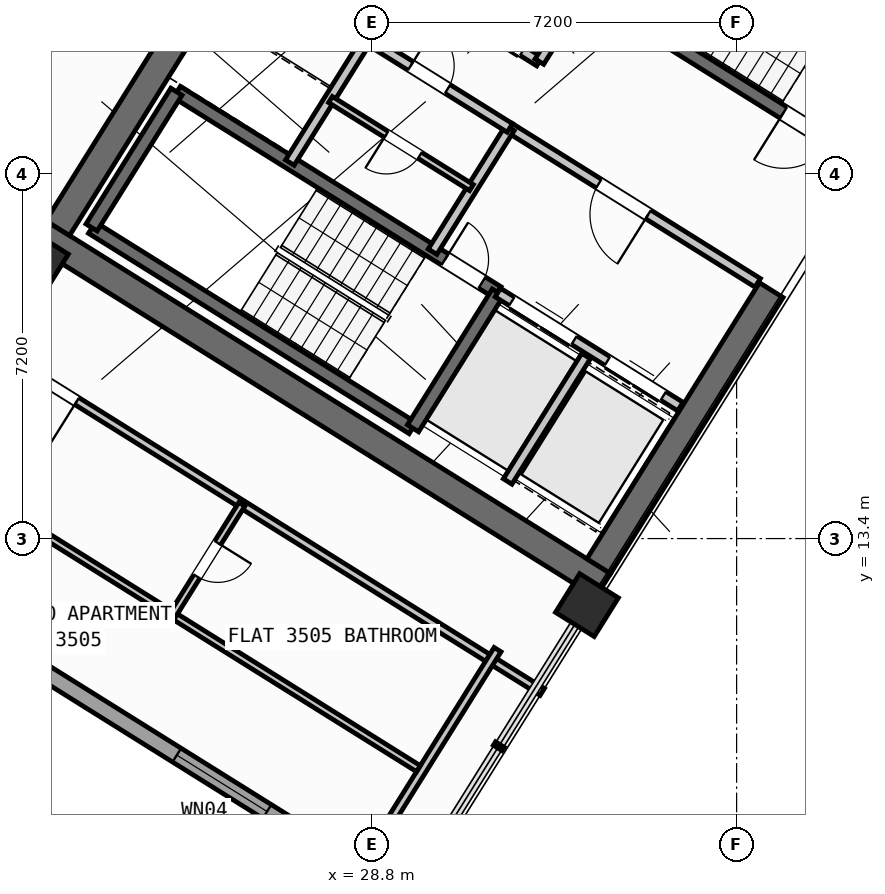
"""IFC4 building model, lengths in metres.
Left out: names, types, materials, properties, quantities, classifications, styles, units other than length and angle.
Written with IfcOpenShell. Run it as: python <this file> out.ifc"""

import sys

from ifc_helpers import new_model, si_unit, direction, frame, frame_2d, origin, origin_2d, place, context, subcontext, project, spatial, rectangle, hollow_rectangle, extrude, source, transform, mapped, element, fill, save


model = new_model("IFC4")
c1 = context("Model", 3, precision=1e-05, world=origin(), true_north=direction((0.0, 1.0)))
c2 = subcontext(c1, "Body", "Model", "MODEL_VIEW")
j1 = project(units=[si_unit("LENGTHUNIT", "METRE"), si_unit("PLANEANGLEUNIT", "RADIAN")], contexts=[c1])
p1 = place(None, origin())
s1 = spatial("IfcSite", under=j1, at=p1, CompositionType="ELEMENT")
p2 = place(p1, origin())
s2 = spatial("IfcBuilding", under=s1, at=p2, CompositionType="ELEMENT")
p3 = place(p2, frame((0.0, 0.0, 140.7)))
s3 = spatial("IfcBuildingStorey", under=s2, at=p3, CompositionType="ELEMENT", Elevation=140.7)
p4 = place(p3, frame((33.366, 12.477, 0.0), z_axis=(0.0, 0.0, 1.0), x_axis=(-0.848047359947, 0.529920442413, 0.0)))
e1 = element("IfcWall", 1, at=p4, inside=s3, PredefinedType="SHEAR", context=c2, shape_type="SweptSolid", body=[
    extrude(rectangle(XDim=13.14, YDim=0.55, at=frame_2d((6.57, 0.0))), origin(), (0.0, 0.0, 1.0), 3.35),
])
p5 = place(p3, frame((36.683, 18.304, 0.0), z_axis=(0.0, 0.0, 1.0), x_axis=(-0.529896466841, -0.848062341122, 0.0)))
e2 = element("IfcWall", 2, at=p5, inside=s3, PredefinedType="SHEAR", context=c2, shape_type="SweptSolid", body=[
    extrude(rectangle(XDim=6.425, YDim=0.55, at=frame_2d((3.212, 0.0))), origin(), (0.0, 0.0, 1.0), 3.35),
])
p6 = place(p3, frame((26.007, 24.976, 0.0), z_axis=(0.0, 0.0, 1.0), x_axis=(-0.529923795287, -0.848045264823, 0.0)))
e3 = element("IfcWall", 3, at=p6, inside=s3, PredefinedType="SHEAR", context=c2, shape_type="SweptSolid", body=[
    extrude(rectangle(XDim=6.425, YDim=0.55, at=frame_2d((3.212, 0.0))), origin(), (0.0, 0.0, 1.0), 3.35),
])
m1 = source(origin(), c2, "Body", "SweptSolid", [
    extrude(hollow_rectangle(XDim=0.9, YDim=0.9, WallThickness=0.036, at=origin_2d()), origin(), (0.0, 0.0, 1.0), 3.6),
])
for number, where, z_axis, x_axis in (
    (4, (33.046, 12.087, 0.0), (0.0, 0.0, 1.0), (-0.848, 0.53, 0.0)),
    (5, (22.191, 18.87, 0.0), (0.0, 0.0, 1.0), (-0.848, 0.53, 0.0)),
):
    element("IfcColumn", number, at=place(p3, frame(where, z_axis=z_axis, x_axis=x_axis)), inside=s3, PredefinedType="COLUMN", context=c2, shape_type="MappedRepresentation", body=[
        mapped(m1, transform((0.0, 0.0, 0.0), scale=1.0)),
    ])
p7 = place(p3, frame((29.268, 6.429, 0.0), z_axis=(0.0, 0.0, 1.0), x_axis=(-0.848049971435, 0.529916263149, 0.0)))
e6 = element("IfcWall", 6, at=p7, inside=s3, PredefinedType="STANDARD", context=c2, shape_type="SweptSolid", body=[
    extrude(rectangle(XDim=31.588, YDim=0.32, at=frame_2d((15.794, 0.0))), origin(), (0.0, 0.0, 1.0), 3.35),
])
p8 = place(p7, frame((16.362, 0.0, 0.0)))
e7 = element("IfcOpeningElement", 7, at=p8, cuts=e6, PredefinedType="OPENING", context=c2, shape_type="SweptSolid", body=[
    extrude(rectangle(XDim=1.2, YDim=2.15, at=frame_2d((0.6, 1.075))), frame((0.0, 0.17, 0.0), z_axis=(0.0, -1.0, 0.0), x_axis=(1.0, 0.0, 0.0)), (0.0, 0.0, 1.0), 0.34),
])
p9 = place(p7, frame((2.989, 0.0, 0.8)))
e8 = element("IfcOpeningElement", 8, at=p9, cuts=e6, PredefinedType="OPENING", context=c2, shape_type="SweptSolid", body=[
    extrude(rectangle(XDim=2.1, YDim=1.55, at=frame_2d((1.05, 0.775))), frame((0.0, 0.17, 0.0), z_axis=(0.0, -1.0, 0.0), x_axis=(1.0, 0.0, 0.0)), (0.0, 0.0, 1.0), 0.34),
])
p10 = place(p7, frame((8.359, 0.0, 0.8)))
e9 = element("IfcOpeningElement", 9, at=p10, cuts=e6, PredefinedType="OPENING", context=c2, shape_type="SweptSolid", body=[
    extrude(rectangle(XDim=2.1, YDim=1.55, at=frame_2d((1.05, 0.775))), frame((0.0, 0.17, 0.0), z_axis=(0.0, -1.0, 0.0), x_axis=(1.0, 0.0, 0.0)), (0.0, 0.0, 1.0), 0.34),
])
p11 = place(p7, frame((13.284, 0.0, 0.95)))
e10 = element("IfcOpeningElement", 10, at=p11, cuts=e6, PredefinedType="OPENING", context=c2, shape_type="SweptSolid", body=[
    extrude(rectangle(XDim=1.2, YDim=1.4, at=frame_2d((0.6, 0.7))), frame((0.0, 0.17, 0.0), z_axis=(0.0, -1.0, 0.0), x_axis=(1.0, 0.0, 0.0)), (0.0, 0.0, 1.0), 0.34),
])
p12 = place(p7, frame((29.188, 0.0, 0.95)))
e11 = element("IfcOpeningElement", 11, at=p12, cuts=e6, PredefinedType="OPENING", context=c2, shape_type="SweptSolid", body=[
    extrude(rectangle(XDim=1.2, YDim=1.4, at=frame_2d((0.6, 0.7))), frame((0.0, 0.17, 0.0), z_axis=(0.0, -1.0, 0.0), x_axis=(1.0, 0.0, 0.0)), (0.0, 0.0, 1.0), 0.34),
])
p13 = place(p7, frame((19.674, 0.0, 1.0)))
e12 = element("IfcOpeningElement", 12, at=p13, cuts=e6, PredefinedType="OPENING", context=c2, shape_type="SweptSolid", body=[
    extrude(rectangle(XDim=0.9, YDim=1.25, at=frame_2d((0.45, 0.625))), frame((0.0, 0.17, 0.0), z_axis=(0.0, -1.0, 0.0), x_axis=(1.0, 0.0, 0.0)), (0.0, 0.0, 1.0), 0.34),
])
p14 = place(p7, frame((21.896, 0.0, 1.0)))
e13 = element("IfcOpeningElement", 13, at=p14, cuts=e6, PredefinedType="OPENING", context=c2, shape_type="SweptSolid", body=[
    extrude(rectangle(XDim=0.9, YDim=1.25, at=frame_2d((0.45, 0.625))), frame((0.0, 0.17, 0.0), z_axis=(0.0, -1.0, 0.0), x_axis=(1.0, 0.0, 0.0)), (0.0, 0.0, 1.0), 0.34),
])
p15 = place(p7, frame((24.106, 0.0, 1.0)))
e14 = element("IfcOpeningElement", 14, at=p15, cuts=e6, PredefinedType="OPENING", context=c2, shape_type="SweptSolid", body=[
    extrude(rectangle(XDim=0.65, YDim=1.15, at=frame_2d((0.325, 0.575))), frame((0.0, 0.17, 0.0), z_axis=(0.0, -1.0, 0.0), x_axis=(1.0, 0.0, 0.0)), (0.0, 0.0, 1.0), 0.34),
])
p16 = place(p7, frame((26.366, 0.0, 1.0)))
e15 = element("IfcOpeningElement", 15, at=p16, cuts=e6, PredefinedType="OPENING", context=c2, shape_type="SweptSolid", body=[
    extrude(rectangle(XDim=0.9, YDim=1.25, at=frame_2d((0.45, 0.625))), frame((0.0, 0.17, 0.0), z_axis=(0.0, -1.0, 0.0), x_axis=(1.0, 0.0, 0.0)), (0.0, 0.0, 1.0), 0.34),
])
p17 = place(p3, frame((29.605, 15.581, 0.0), z_axis=(0.0, 0.0, 1.0), x_axis=(-0.848036911448, 0.529937163087, 0.0)))
e16 = element("IfcWall", 16, at=p17, inside=s3, PredefinedType="SHEAR", context=c2, shape_type="SweptSolid", body=[
    extrude(rectangle(XDim=7.46, YDim=0.26, at=frame_2d((3.73, 0.0))), origin(), (0.0, 0.0, 1.0), 3.35),
])
p18 = place(p3, frame((31.28, 18.261, 0.0), z_axis=(0.0, 0.0, 1.0), x_axis=(-0.848051618787, 0.529913626805, 0.0)))
e17 = element("IfcWall", 17, at=p18, inside=s3, PredefinedType="SHEAR", context=c2, shape_type="SweptSolid", body=[
    extrude(rectangle(XDim=7.46, YDim=0.26, at=frame_2d((3.73, 0.0))), origin(), (0.0, 0.0, 1.0), 3.35),
])
p19 = place(p18, frame((0.36, 0.0, 0.0)))
e18 = element("IfcOpeningElement", 18, at=p19, cuts=e17, PredefinedType="OPENING", context=c2, shape_type="SweptSolid", body=[
    extrude(rectangle(XDim=0.86, YDim=2.05, at=frame_2d((0.43, 1.025))), frame((0.0, 0.14, 0.0), z_axis=(0.0, -1.0, 0.0), x_axis=(1.0, 0.0, 0.0)), (0.0, 0.0, 1.0), 0.28),
])
p20 = place(p3, frame((31.288, 18.256, 0.0), z_axis=(0.0, 0.0, 1.0), x_axis=(-0.529943379326, -0.848033026897, 0.0)))
e19 = element("IfcWall", 19, at=p20, inside=s3, PredefinedType="SHEAR", context=c2, shape_type="SweptSolid", body=[
    extrude(rectangle(XDim=3.16, YDim=0.26, at=frame_2d((1.58, 0.0))), origin(), (0.0, 0.0, 1.0), 3.35),
])
p21 = place(p3, frame((24.945, 22.22, 0.0), z_axis=(0.0, 0.0, 1.0), x_axis=(-0.529908658664, -0.84805472316, 0.0)))
e20 = element("IfcWall", 20, at=p21, inside=s3, PredefinedType="SHEAR", context=c2, shape_type="SweptSolid", body=[
    extrude(rectangle(XDim=3.16, YDim=0.26, at=frame_2d((1.58, 0.0))), origin(), (0.0, 0.0, 1.0), 3.35),
])
p22 = place(p3, frame((38.046, 21.108, 0.0), z_axis=(0.0, 0.0, 1.0), x_axis=(-0.848054434086, 0.529909121291, 0.0)))
e21 = element("IfcWall", 21, at=p22, inside=s3, PredefinedType="SHEAR", context=c2, shape_type="SweptSolid", body=[
    extrude(rectangle(XDim=7.33, YDim=0.26, at=frame_2d((3.665, 0.0))), origin(), (0.0, 0.0, 1.0), 3.35),
])
p23 = place(p22, frame((0.22, 0.0, 0.0)))
e22 = element("IfcOpeningElement", 22, at=p23, cuts=e21, PredefinedType="OPENING", context=c2, shape_type="SweptSolid", body=[
    extrude(rectangle(XDim=1.1, YDim=2.1, at=frame_2d((0.55, 1.05))), frame((0.0, 0.14, 0.0), z_axis=(0.0, -1.0, 0.0), x_axis=(1.0, 0.0, 0.0)), (0.0, 0.0, 1.0), 0.28),
])
p24 = place(p3, frame((34.891, 16.005, 0.0), z_axis=(0.0, 0.0, 1.0), x_axis=(-0.848062873452, 0.529895614884, 0.0)))
e23 = element("IfcWall", 23, at=p24, inside=s3, PredefinedType="STANDARD", context=c2, shape_type="SweptSolid", body=[
    extrude(rectangle(XDim=4.248, YDim=0.2, at=frame_2d((2.124, 0.0))), origin(), (0.0, 0.0, 1.0), 3.34),
])
p25 = place(p24, frame((0.398, 0.0, 0.0)))
e24 = element("IfcOpeningElement", 24, at=p25, cuts=e23, PredefinedType="OPENING", context=c2, shape_type="SweptSolid", body=[
    extrude(rectangle(XDim=1.3, YDim=2.2, at=frame_2d((0.65, 1.1))), frame((0.0, 0.11, 0.0), z_axis=(0.0, -1.0, 0.0), x_axis=(1.0, 0.0, 0.0)), (0.0, 0.0, 1.0), 0.22),
])
p26 = place(p24, frame((2.473, 0.0, 0.0)))
e25 = element("IfcOpeningElement", 25, at=p26, cuts=e23, PredefinedType="OPENING", context=c2, shape_type="SweptSolid", body=[
    extrude(rectangle(XDim=1.45, YDim=2.25, at=frame_2d((0.725, 1.125))), frame((0.0, 0.11, 0.0), z_axis=(0.0, -1.0, 0.0), x_axis=(1.0, 0.0, 0.0)), (0.0, 0.0, 1.0), 0.22),
])
p27 = place(p3, frame((36.417, 18.447, 0.0), z_axis=(0.0, 0.0, 1.0), x_axis=(-0.848064879198, 0.529892404805, 0.0)))
e26 = element("IfcWall", 26, at=p27, inside=s3, PredefinedType="STANDARD", context=c2, shape_type="SweptSolid", body=[
    extrude(rectangle(XDim=5.768, YDim=0.2, at=frame_2d((2.884, 0.0))), origin(), (0.0, 0.0, 1.0), 3.34),
])
p28 = place(p27, frame((2.548, 0.0, 0.0)))
e27 = element("IfcOpeningElement", 27, at=p28, cuts=e26, PredefinedType="OPENING", context=c2, shape_type="SweptSolid", body=[
    extrude(rectangle(XDim=1.15, YDim=2.1, at=frame_2d((0.575, 1.05))), frame((0.0, 0.11, 0.0), z_axis=(0.0, -1.0, 0.0), x_axis=(1.0, 0.0, 0.0)), (0.0, 0.0, 1.0), 0.22),
])
p29 = place(p3, frame((32.108, 22.814, 0.0), z_axis=(0.0, 0.0, 1.0), x_axis=(-0.848042229521, 0.529928652696, 0.0)))
e28 = element("IfcWall", 28, at=p29, inside=s3, PredefinedType="STANDARD", context=c2, shape_type="SweptSolid", body=[
    extrude(rectangle(XDim=5.62, YDim=0.2, at=frame_2d((2.81, 0.0))), origin(), (0.0, 0.0, 1.0), 3.34),
])
p30 = place(p29, frame((0.39, 0.0, 0.0)))
e29 = element("IfcOpeningElement", 29, at=p30, cuts=e28, PredefinedType="OPENING", context=c2, shape_type="SweptSolid", body=[
    extrude(rectangle(XDim=1.1, YDim=2.15, at=frame_2d((0.55, 1.075))), frame((0.0, 0.11, 0.0), z_axis=(0.0, -1.0, 0.0), x_axis=(1.0, 0.0, 0.0)), (0.0, 0.0, 1.0), 0.22),
])
p31 = place(p29, frame((2.25, 0.0, 0.0)))
e30 = element("IfcOpeningElement", 30, at=p31, cuts=e28, PredefinedType="OPENING", context=c2, shape_type="SweptSolid", body=[
    extrude(rectangle(XDim=1.1, YDim=2.15, at=frame_2d((0.55, 1.075))), frame((0.0, 0.11, 0.0), z_axis=(0.0, -1.0, 0.0), x_axis=(1.0, 0.0, 0.0)), (0.0, 0.0, 1.0), 0.22),
])
p32 = place(p29, frame((4.11, 0.0, 0.0)))
e31 = element("IfcOpeningElement", 31, at=p32, cuts=e28, PredefinedType="OPENING", context=c2, shape_type="SweptSolid", body=[
    extrude(rectangle(XDim=1.1, YDim=2.15, at=frame_2d((0.55, 1.075))), frame((0.0, 0.11, 0.0), z_axis=(0.0, -1.0, 0.0), x_axis=(1.0, 0.0, 0.0)), (0.0, 0.0, 1.0), 0.22),
])
p33 = place(p3, frame((32.982, 24.213, 0.0), z_axis=(0.0, 0.0, 1.0), x_axis=(-0.529839334948, -0.84809803628, 0.0)))
e32 = element("IfcWall", 32, at=p33, inside=s3, PredefinedType="STANDARD", context=c2, shape_type="SweptSolid", body=[
    extrude(rectangle(XDim=1.65, YDim=0.2, at=frame_2d((0.825, 0.0))), origin(), (0.0, 0.0, 1.0), 3.34),
])
p34 = place(p3, frame((33.029, 17.003, 0.0), z_axis=(0.0, 0.0, 1.0), x_axis=(-0.529916267533, -0.848049968695, 0.0)))
e33 = element("IfcWall", 33, at=p34, inside=s3, PredefinedType="STANDARD", context=c2, shape_type="SweptSolid", body=[
    extrude(rectangle(XDim=2.92, YDim=0.2, at=frame_2d((1.46, 0.0))), origin(), (0.0, 0.0, 1.0), 3.34),
])
for number, where, z_axis, x_axis in (
    (34, (31.525, 21.504, 0.0), (0.0, 0.0, 1.0), (-0.53, -0.848, 0.0)),
    (35, (28.71, 23.263, 0.0), (0.0, 0.0, 1.0), (-0.53, -0.848, 0.0)),
):
    element("IfcWall", number, at=place(p3, frame(where, z_axis=z_axis, x_axis=x_axis)), inside=s3, PredefinedType="STANDARD", context=c2, shape_type="SweptSolid", body=[
        extrude(rectangle(XDim=2.88, YDim=0.2, at=frame_2d((1.44, 0.0))), origin(), (0.0, 0.0, 1.0), 3.34),
    ])
p35 = place(p3, frame((31.525, 21.504, 0.0), z_axis=(0.0, 0.0, 1.0), x_axis=(-0.848040211232, 0.529931882541, 0.0)))
e36 = element("IfcWall", 36, at=p35, inside=s3, PredefinedType="STANDARD", context=c2, shape_type="SweptSolid", body=[
    extrude(rectangle(XDim=6.218, YDim=0.2, at=frame_2d((3.109, 0.0))), origin(), (0.0, 0.0, 1.0), 3.34),
])
p36 = place(p35, frame((4.4, 0.0, 0.0)))
e37 = element("IfcOpeningElement", 37, at=p36, cuts=e36, PredefinedType="OPENING", context=c2, shape_type="SweptSolid", body=[
    extrude(rectangle(XDim=0.86, YDim=2.05, at=frame_2d((0.43, 1.025))), frame((0.0, 0.11, 0.0), z_axis=(0.0, -1.0, 0.0), x_axis=(1.0, 0.0, 0.0)), (0.0, 0.0, 1.0), 0.22),
])
p37 = place(p35, frame((1.45, 0.0, 0.0)))
e38 = element("IfcOpeningElement", 38, at=p37, cuts=e36, PredefinedType="OPENING", context=c2, shape_type="SweptSolid", body=[
    extrude(rectangle(XDim=0.86, YDim=2.05, at=frame_2d((0.43, 1.025))), frame((0.0, 0.11, 0.0), z_axis=(0.0, -1.0, 0.0), x_axis=(1.0, 0.0, 0.0)), (0.0, 0.0, 1.0), 0.22),
])
p38 = place(p3, frame((30.766, 20.327, 0.0), z_axis=(0.0, 0.0, 1.0), x_axis=(-0.848052663127, 0.529911955482, 0.0)))
e39 = element("IfcWall", 39, at=p38, inside=s3, PredefinedType="PLUMBINGWALL", context=c2, shape_type="SweptSolid", body=[
    extrude(rectangle(XDim=3.28, YDim=0.14, at=frame_2d((1.64, 0.0))), origin(), (0.0, 0.0, 1.0), 3.34),
])
p39 = place(p38, frame((1.2, 0.0, 0.0)))
e40 = element("IfcOpeningElement", 40, at=p39, cuts=e39, PredefinedType="OPENING", context=c2, shape_type="SweptSolid", body=[
    extrude(rectangle(XDim=0.78, YDim=2.05, at=frame_2d((0.39, 1.025))), frame((0.0, 0.08, 0.0), z_axis=(0.0, -1.0, 0.0), x_axis=(1.0, 0.0, 0.0)), (0.0, 0.0, 1.0), 0.16),
])
p40 = place(p3, frame((32.164, 10.374, 0.0), z_axis=(0.0, 0.0, 1.0), x_axis=(-0.848044107957, 0.529925646633, 0.0)))
e41 = element("IfcWall", 41, at=p40, inside=s3, PredefinedType="PARTITIONING", context=c2, shape_type="SweptSolid", body=[
    extrude(rectangle(XDim=15.57, YDim=0.16, at=frame_2d((7.785, 0.0))), origin(), (0.0, 0.0, 1.0), 3.34),
])
p41 = place(p40, frame((10.83, 0.0, 0.0)))
e42 = element("IfcOpeningElement", 42, at=p41, cuts=e41, PredefinedType="OPENING", context=c2, shape_type="SweptSolid", body=[
    extrude(rectangle(XDim=1.0, YDim=2.1, at=frame_2d((0.5, 1.05))), frame((0.0, 0.09, 0.0), z_axis=(0.0, -1.0, 0.0), x_axis=(1.0, 0.0, 0.0)), (0.0, 0.0, 1.0), 0.18),
])
p42 = place(p3, frame((31.282, 11.208, 0.0), z_axis=(0.0, 0.0, 1.0), x_axis=(-0.529938869374, -0.84803584519, 0.0)))
e43 = element("IfcWall", 43, at=p42, inside=s3, PredefinedType="PARTITIONING", context=c2, shape_type="SweptSolid", body=[
    extrude(rectangle(XDim=5.48, YDim=0.16, at=frame_2d((2.74, 0.0))), origin(), (0.0, 0.0, 1.0), 3.34),
])
p43 = place(p3, frame((29.72, 8.859, 0.0), z_axis=(0.0, 0.0, 1.0), x_axis=(-0.848049134363, 0.529917602752, 0.0)))
e44 = element("IfcWall", 44, at=p43, inside=s3, PredefinedType="PLUMBINGWALL", context=c2, shape_type="SweptSolid", body=[
    extrude(rectangle(XDim=14.3, YDim=0.14, at=frame_2d((7.15, 0.0))), origin(), (0.0, 0.0, 1.0), 3.34),
])
p44 = place(p43, frame((9.57, 0.0, 0.0)))
e45 = element("IfcOpeningElement", 45, at=p44, cuts=e44, PredefinedType="OPENING", context=c2, shape_type="SweptSolid", body=[
    extrude(rectangle(XDim=0.92, YDim=2.08, at=frame_2d((0.46, 1.04))), frame((0.0, 0.08, 0.0), z_axis=(0.0, -1.0, 0.0), x_axis=(1.0, 0.0, 0.0)), (0.0, 0.0, 1.0), 0.16),
])
p45 = place(p3, frame((26.237, 14.078, 0.0), z_axis=(0.0, 0.0, 1.0), x_axis=(-0.52995640672, -0.848024885824, 0.0)))
e46 = element("IfcWall", 46, at=p45, inside=s3, PredefinedType="PLUMBINGWALL", context=c2, shape_type="SweptSolid", body=[
    extrude(rectangle(XDim=2.58, YDim=0.14, at=frame_2d((1.29, 0.0))), origin(), (0.0, 0.0, 1.0), 3.34),
])
p46 = place(p45, frame((0.9, 0.0, 0.0)))
e47 = element("IfcOpeningElement", 47, at=p46, cuts=e46, PredefinedType="OPENING", context=c2, shape_type="SweptSolid", body=[
    extrude(rectangle(XDim=0.78, YDim=2.05, at=frame_2d((0.39, 1.025))), frame((0.0, 0.08, 0.0), z_axis=(0.0, -1.0, 0.0), x_axis=(1.0, 0.0, 0.0)), (0.0, 0.0, 1.0), 0.16),
])
m2 = source(origin(), c2, "Body", "SweptSolid", [
    extrude(rectangle(XDim=2.1, YDim=1.55, at=frame_2d((1.05, 0.775))), frame((0.0, 0.03, 0.0), z_axis=(0.0, -1.0, 0.0), x_axis=(1.0, 0.0, 0.0)), (0.0, 0.0, 1.0), 0.06),
])
p47 = place(p9, origin())
e48 = element("IfcWindow", 48, at=p47, inside=s3, PartitioningType="SINGLE_PANEL", PredefinedType="WINDOW", context=c2, shape_type="MappedRepresentation", body=[
    mapped(m2, transform((0.0, 0.0, 0.0), scale=1.0)),
])
fill(e8, e48)
m3 = source(origin(), c2, "Body", "SweptSolid", [
    extrude(rectangle(XDim=0.86, YDim=2.05, at=frame_2d((0.43, 1.025))), frame((0.0, 0.025, 0.0), z_axis=(0.0, -1.0, 0.0), x_axis=(1.0, 0.0, 0.0)), (0.0, 0.0, 1.0), 0.05),
])
p48 = place(p19, frame((0.86, 0.0, 0.0), z_axis=(0.0, 0.0, 1.0), x_axis=(-1.0, 0.0, 0.0)))
e49 = element("IfcDoor", 49, at=p48, inside=s3, OperationType="SINGLE_SWING_LEFT", PredefinedType="DOOR", context=c2, shape_type="MappedRepresentation", body=[
    mapped(m3, transform((0.0, 0.0, 0.0), scale=1.0)),
])
fill(e18, e49)
m4 = source(origin(), c2, "Body", "SweptSolid", [
    extrude(rectangle(XDim=1.1, YDim=2.1, at=frame_2d((0.55, 1.05))), frame((0.0, 0.025, 0.0), z_axis=(0.0, -1.0, 0.0), x_axis=(1.0, 0.0, 0.0)), (0.0, 0.0, 1.0), 0.05),
])
p49 = place(p23, origin())
e50 = element("IfcDoor", 50, at=p49, inside=s3, OperationType="SINGLE_SWING_RIGHT", PredefinedType="DOOR", context=c2, shape_type="MappedRepresentation", body=[
    mapped(m4, transform((0.0, 0.0, 0.0), scale=1.0)),
])
fill(e22, e50)
m5 = source(origin(), c2, "Body", "SweptSolid", [
    extrude(rectangle(XDim=1.15, YDim=2.1, at=frame_2d((0.575, 1.05))), frame((0.0, 0.025, 0.0), z_axis=(0.0, -1.0, 0.0), x_axis=(1.0, 0.0, 0.0)), (0.0, 0.0, 1.0), 0.05),
])
p50 = place(p28, origin())
e51 = element("IfcDoor", 51, at=p50, inside=s3, OperationType="SINGLE_SWING_LEFT", PredefinedType="DOOR", context=c2, shape_type="MappedRepresentation", body=[
    mapped(m5, transform((0.0, 0.0, 0.0), scale=1.0)),
])
fill(e27, e51)
m6 = source(origin(), c2, "Body", "SweptSolid", [
    extrude(rectangle(XDim=1.3, YDim=2.2, at=frame_2d((0.65, 1.1))), frame((0.0, 0.025, 0.0), z_axis=(0.0, -1.0, 0.0), x_axis=(1.0, 0.0, 0.0)), (0.0, 0.0, 1.0), 0.05),
])
p51 = place(p25, origin())
e52 = element("IfcDoor", 52, at=p51, inside=s3, OperationType="DOUBLE_DOOR_SLIDING", PredefinedType="DOOR", context=c2, shape_type="MappedRepresentation", body=[
    mapped(m6, transform((0.0, 0.0, 0.0), scale=1.0)),
])
fill(e24, e52)
m7 = source(origin(), c2, "Body", "SweptSolid", [
    extrude(rectangle(XDim=1.45, YDim=2.25, at=frame_2d((0.725, 1.125))), frame((0.0, 0.025, 0.0), z_axis=(0.0, -1.0, 0.0), x_axis=(1.0, 0.0, 0.0)), (0.0, 0.0, 1.0), 0.05),
])
p52 = place(p26, origin())
e53 = element("IfcDoor", 53, at=p52, inside=s3, OperationType="DOUBLE_DOOR_SLIDING", PredefinedType="DOOR", context=c2, shape_type="MappedRepresentation", body=[
    mapped(m7, transform((0.0, 0.0, 0.0), scale=1.0)),
])
fill(e25, e53)
p53 = place(p37, frame((0.86, 0.0, 0.0), z_axis=(0.0, 0.0, 1.0), x_axis=(-1.0, 0.0, 0.0)))
e54 = element("IfcDoor", 54, at=p53, inside=s3, OperationType="SINGLE_SWING_LEFT", PredefinedType="DOOR", context=c2, shape_type="MappedRepresentation", body=[
    mapped(m3, transform((0.0, 0.0, 0.0), scale=1.0)),
])
fill(e38, e54)
m8 = source(origin(), c2, "Body", "SweptSolid", [
    extrude(rectangle(XDim=0.78, YDim=2.05, at=frame_2d((0.39, 1.025))), frame((0.0, 0.025, 0.0), z_axis=(0.0, -1.0, 0.0), x_axis=(1.0, 0.0, 0.0)), (0.0, 0.0, 1.0), 0.05),
])
p54 = place(p39, origin())
e55 = element("IfcDoor", 55, at=p54, inside=s3, OperationType="SINGLE_SWING_RIGHT", PredefinedType="DOOR", context=c2, shape_type="MappedRepresentation", body=[
    mapped(m8, transform((0.0, 0.0, 0.0), scale=1.0)),
])
fill(e40, e55)
m9 = source(origin(), c2, "Body", "SweptSolid", [
    extrude(rectangle(XDim=1.0, YDim=2.1, at=frame_2d((0.5, 1.05))), frame((0.0, 0.025, 0.0), z_axis=(0.0, -1.0, 0.0), x_axis=(1.0, 0.0, 0.0)), (0.0, 0.0, 1.0), 0.05),
])
p55 = place(p41, origin())
e56 = element("IfcDoor", 56, at=p55, inside=s3, OperationType="SINGLE_SWING_LEFT", PredefinedType="DOOR", context=c2, shape_type="MappedRepresentation", body=[
    mapped(m9, transform((0.0, 0.0, 0.0), scale=1.0)),
])
fill(e42, e56)
p56 = place(p46, origin())
e57 = element("IfcDoor", 57, at=p56, inside=s3, OperationType="SINGLE_SWING_LEFT", PredefinedType="DOOR", context=c2, shape_type="MappedRepresentation", body=[
    mapped(m8, transform((0.0, 0.0, 0.0), scale=1.0)),
])
fill(e47, e57)
save(model, sys.argv[1])
